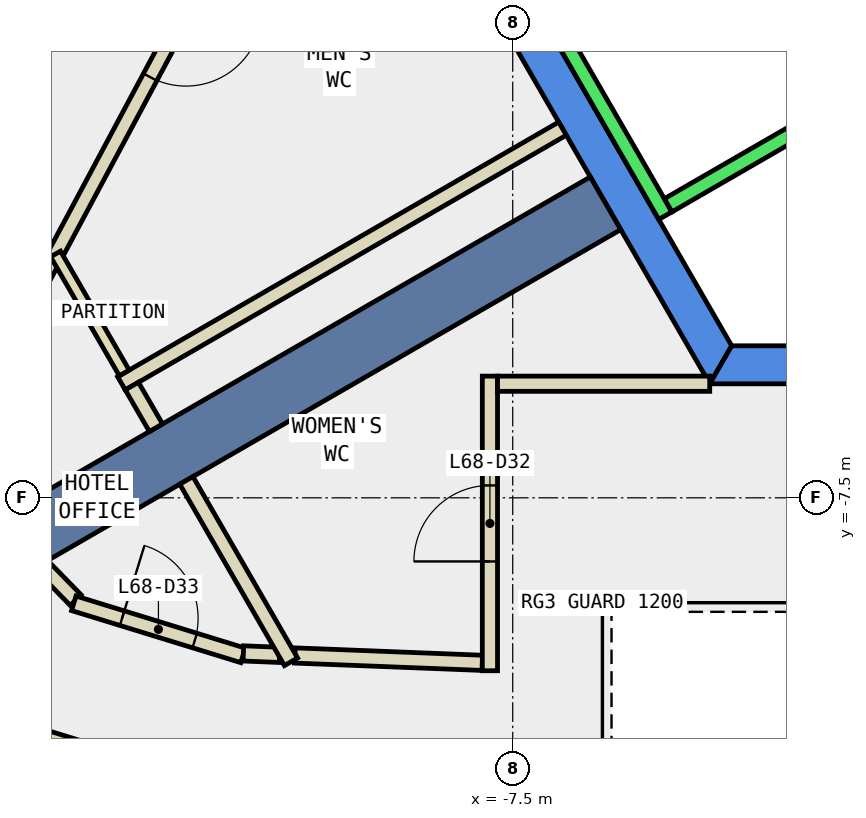
"""IFC4 building model, lengths in metres.
Left out: names, types, materials, properties, quantities, classifications, styles, units other than length and angle.
Written with IfcOpenShell. Run it as: python <this file> out.ifc"""

import sys

from ifc_helpers import new_model, si_unit, direction, frame, frame_2d, origin, place, context, subcontext, project, spatial, polyline, rectangle, outline, extrude, element, fill, save


model = new_model("IFC4")
c1 = context("Model", 3, precision=1e-05, world=origin(), true_north=direction((0.0, 1.0)))
c2 = subcontext(c1, "Body", "Model", "MODEL_VIEW")
j1 = project(units=[si_unit("LENGTHUNIT", "METRE"), si_unit("PLANEANGLEUNIT", "RADIAN")], contexts=[c1])
p1 = place(None, origin())
s1 = spatial("IfcSite", under=j1, at=p1, CompositionType="ELEMENT")
p2 = place(p1, origin())
s2 = spatial("IfcBuilding", under=s1, at=p2, CompositionType="ELEMENT")
p3 = place(p2, frame((0.0, 0.0, 293.6)))
s3 = spatial("IfcBuildingStorey", under=s2, at=p3, CompositionType="ELEMENT", Elevation=293.6)
p4 = place(p3, frame((0.0, 0.0, -0.34)))
e1 = element("IfcWall", 1, at=p4, inside=s3, PredefinedType="SHEAR", context=c2, shape_type="SweptSolid", body=[
    extrude(outline(polyline([(-9.815, 2.5), (-4.907, -6.0), (-4.619, -5.5), (-9.238, 2.5), (-9.815, 2.5)])), origin(), (0.0, 0.0, 1.0), 3.6),
])
p5 = place(p3, frame((0.0, 0.0, -0.34)))
e2 = element("IfcWall", 2, at=p5, inside=s3, PredefinedType="SHEAR", context=c2, shape_type="SweptSolid", body=[
    extrude(outline(polyline([(3.75, -6.0), (3.75, -5.5), (-4.619, -5.5), (-4.907, -6.0), (3.75, -6.0)])), origin(), (0.0, 0.0, 1.0), 3.6),
])
p6 = place(p3, frame((-6.279, -3.625, -0.34), z_axis=(0.0, 0.0, 1.0), x_axis=(-0.866017533419, -0.500013631625, 0.0)))
e3 = element("IfcWall", 3, at=p6, inside=s3, PredefinedType="SHEAR", context=c2, shape_type="SweptSolid", body=[
    extrude(rectangle(XDim=9.0, YDim=0.8, at=frame_2d((4.5, 0.0))), origin(), (0.0, 0.0, 1.0), 3.6),
])
p7 = place(p3, frame((-10.639, 1.084, 0.0), z_axis=(0.0, 0.0, 1.0), x_axis=(-0.471696599276, -0.881760918975, 0.0)))
e4 = element("IfcWall", 4, at=p7, inside=s3, PredefinedType="PARTITIONING", context=c2, shape_type="SweptSolid", body=[
    extrude(rectangle(XDim=6.172, YDim=0.2, at=frame_2d((3.086, 0.0))), origin(), (0.0, 0.0, 1.0), 3.26),
])
p8 = place(p7, frame((2.458, 0.0, 0.0)))
e5 = element("IfcOpeningElement", 5, at=p8, cuts=e4, PredefinedType="OPENING", context=c2, shape_type="SweptSolid", body=[
    extrude(rectangle(XDim=1.0, YDim=2.1, at=frame_2d((0.5, 1.05))), frame((0.0, 0.11, 0.0), z_axis=(0.0, -1.0, 0.0), x_axis=(1.0, 0.0, 0.0)), (0.0, 0.0, 1.0), 0.22),
])
p9 = place(p3, frame((-10.367, -9.574, 0.0), z_axis=(0.0, 0.0, 1.0), x_axis=(0.999229139158, -0.039257196264, 0.0)))
e6 = element("IfcWall", 6, at=p9, inside=s3, PredefinedType="PARTITIONING", context=c2, shape_type="SweptSolid", body=[
    extrude(rectangle(XDim=2.469, YDim=0.2, at=frame_2d((1.234, 0.0))), origin(), (0.0, 0.0, 1.0), 3.26),
])
p10 = place(p3, frame((-13.55, -4.358, 0.0), z_axis=(0.0, 0.0, 1.0), x_axis=(-0.472169364753, -0.881507850781, 0.0)))
e7 = element("IfcWall", 7, at=p10, inside=s3, PredefinedType="PARTITIONING", context=c2, shape_type="SweptSolid", body=[
    extrude(rectangle(XDim=0.521, YDim=0.2, at=frame_2d((0.26, 0.0))), origin(), (0.0, 0.0, 1.0), 3.26),
])
p11 = place(p3, frame((-13.69, -8.395, 0.0), z_axis=(0.0, 0.0, 1.0), x_axis=(0.698333537371, -0.715772499181, 0.0)))
e8 = element("IfcWall", 8, at=p11, inside=s3, PredefinedType="PARTITIONING", context=c2, shape_type="SweptSolid", body=[
    extrude(rectangle(XDim=0.63, YDim=0.2, at=frame_2d((0.315, 0.0))), origin(), (0.0, 0.0, 1.0), 3.26),
])
p12 = place(p3, frame((-13.275, -8.888, 0.0), z_axis=(0.0, 0.0, 1.0), x_axis=(0.955792602122, -0.294041666654, 0.0)))
e9 = element("IfcWall", 9, at=p12, inside=s3, PredefinedType="PARTITIONING", context=c2, shape_type="SweptSolid", body=[
    extrude(rectangle(XDim=2.33, YDim=0.2, at=frame_2d((1.165, 0.0))), origin(), (0.0, 0.0, 1.0), 3.26),
])
p13 = place(p12, frame((0.665, 0.0, 0.0)))
e10 = element("IfcOpeningElement", 10, at=p13, cuts=e9, PredefinedType="OPENING", context=c2, shape_type="SweptSolid", body=[
    extrude(rectangle(XDim=1.0, YDim=2.1, at=frame_2d((0.5, 1.05))), frame((0.0, 0.11, 0.0), z_axis=(0.0, -1.0, 0.0), x_axis=(1.0, 0.0, 0.0)), (0.0, 0.0, 1.0), 0.22),
])
p14 = place(p3, frame((-11.044, -9.547, 0.0), z_axis=(0.0, 0.0, 1.0), x_axis=(0.999224473046, -0.039375785274, 0.0)))
e11 = element("IfcWall", 11, at=p14, inside=s3, PredefinedType="PARTITIONING", context=c2, shape_type="SweptSolid", body=[
    extrude(rectangle(XDim=0.478, YDim=0.2, at=frame_2d((0.239, 0.0))), origin(), (0.0, 0.0, 1.0), 3.26),
])
p15 = place(p3, frame((-12.427, -11.032, 0.0), z_axis=(0.0, 0.0, 1.0), x_axis=(-0.955940341053, 0.293561006177, 0.0)))
e12 = element("IfcWall", 12, at=p15, inside=s3, PredefinedType="PARTITIONING", context=c2, shape_type="SweptSolid", body=[
    extrude(rectangle(XDim=1.7, YDim=0.2, at=frame_2d((0.85, 0.0))), origin(), (0.0, 0.0, 1.0), 3.26),
])
p16 = place(p3, frame((-7.8, -9.775, 0.0), z_axis=(0.0, 0.0, 1.0), x_axis=(0.0, 1.0, 0.0)))
e13 = element("IfcWall", 13, at=p16, inside=s3, PredefinedType="PARTITIONING", context=c2, shape_type="SweptSolid", body=[
    extrude(rectangle(XDim=3.876, YDim=0.2, at=frame_2d((1.938, 0.0))), origin(), (0.0, 0.0, 1.0), 3.26),
])
p17 = place(p16, frame((1.438, 0.0, 0.0)))
e14 = element("IfcOpeningElement", 14, at=p17, cuts=e13, PredefinedType="OPENING", context=c2, shape_type="SweptSolid", body=[
    extrude(rectangle(XDim=1.0, YDim=2.1, at=frame_2d((0.5, 1.05))), frame((0.0, 0.11, 0.0), z_axis=(0.0, -1.0, 0.0), x_axis=(1.0, 0.0, 0.0)), (0.0, 0.0, 1.0), 0.22),
])
p18 = place(p3, frame((-7.7, -5.999, 0.0), z_axis=(0.0, 0.0, 1.0), x_axis=(1.0, 0.0, 0.0)))
e15 = element("IfcWall", 15, at=p18, inside=s3, PredefinedType="PARTITIONING", context=c2, shape_type="SweptSolid", body=[
    extrude(rectangle(XDim=2.792, YDim=0.2, at=frame_2d((1.396, 0.0))), origin(), (0.0, 0.0, 1.0), 3.26),
])
p19 = place(p3, frame((-6.845, -2.643, 0.0), z_axis=(0.0, 0.0, 1.0), x_axis=(-0.865994457699, -0.500053596362, 0.0)))
e16 = element("IfcWall", 16, at=p19, inside=s3, PredefinedType="PARTITIONING", context=c2, shape_type="SweptSolid", body=[
    extrude(rectangle(XDim=6.701, YDim=0.2, at=frame_2d((3.351, 0.0))), origin(), (0.0, 0.0, 1.0), 3.26),
])
p20 = place(p3, frame((-12.611, -5.857, 0.0), z_axis=(0.0, 0.0, 1.0), x_axis=(-0.500120037633, 0.865956088932, 0.0)))
e17 = element("IfcWall", 17, at=p20, inside=s3, PredefinedType="PARTITIONING", context=c2, shape_type="SweptSolid", body=[
    extrude(rectangle(XDim=1.807, YDim=0.15, at=frame_2d((0.904, 0.0))), origin(), (0.0, 0.0, 1.0), 3.26),
])
p21 = place(p3, frame((-10.417, -9.657, 0.0), z_axis=(0.0, 0.0, 1.0), x_axis=(-0.499837531988, 0.866119184418, 0.0)))
e18 = element("IfcWall", 18, at=p21, inside=s3, PredefinedType="PARTITIONING", context=c2, shape_type="SweptSolid", body=[
    extrude(rectangle(XDim=2.755, YDim=0.2, at=frame_2d((1.377, 0.0))), origin(), (0.0, 0.0, 1.0), 3.26),
])
p22 = place(p3, frame((-12.194, -6.578, 0.0), z_axis=(0.0, 0.0, 1.0), x_axis=(-0.500701704226, 0.865619895442, 0.0)))
e19 = element("IfcWall", 19, at=p22, inside=s3, PredefinedType="PARTITIONING", context=c2, shape_type="SweptSolid", body=[
    extrude(rectangle(XDim=0.633, YDim=0.2, at=frame_2d((0.316, 0.0))), origin(), (0.0, 0.0, 1.0), 3.26),
])
p23 = place(p3, frame((-5.94, 2.188, 0.0), z_axis=(0.0, 0.0, 1.0), x_axis=(0.500034260056, -0.866005622828, 0.0)))
e20 = element("IfcWall", 20, at=p23, inside=s3, PredefinedType="STANDARD", context=c2, shape_type="SweptSolid", body=[
    extrude(rectangle(XDim=5.399, YDim=0.2, at=frame_2d((2.7, 0.0))), origin(), (0.0, 0.0, 1.0), 3.26),
])
p24 = place(p23, frame((3.075, 0.0, 0.0)))
e21 = element("IfcOpeningElement", 21, at=p24, cuts=e20, PredefinedType="OPENING", context=c2, shape_type="SweptSolid", body=[
    extrude(rectangle(XDim=1.1, YDim=2.1, at=frame_2d((0.55, 1.05))), frame((0.0, 0.11, 0.0), z_axis=(0.0, -1.0, 0.0), x_axis=(1.0, 0.0, 0.0)), (0.0, 0.0, 1.0), 0.22),
])
p25 = place(p23, frame((1.225, 0.0, 0.0)))
e22 = element("IfcOpeningElement", 22, at=p25, cuts=e20, PredefinedType="OPENING", context=c2, shape_type="SweptSolid", body=[
    extrude(rectangle(XDim=1.1, YDim=2.1, at=frame_2d((0.55, 1.05))), frame((0.0, 0.11, 0.0), z_axis=(0.0, -1.0, 0.0), x_axis=(1.0, 0.0, 0.0)), (0.0, 0.0, 1.0), 0.22),
])
p26 = place(p3, frame((-8.192, 0.888, 0.0), z_axis=(0.0, 0.0, 1.0), x_axis=(0.500034260056, -0.866005622828, 0.0)))
e23 = element("IfcWall", 23, at=p26, inside=s3, PredefinedType="STANDARD", context=c2, shape_type="SweptSolid", body=[
    extrude(rectangle(XDim=5.399, YDim=0.2, at=frame_2d((2.7, 0.0))), origin(), (0.0, 0.0, 1.0), 3.26),
])
p27 = place(p3, frame((-3.377, -2.452, 0.0), z_axis=(0.0, 0.0, 1.0), x_axis=(-0.865955154139, -0.50012165622, 0.0)))
e24 = element("IfcWall", 24, at=p27, inside=s3, PredefinedType="STANDARD", context=c2, shape_type="SweptSolid", body=[
    extrude(rectangle(XDim=2.4, YDim=0.2, at=frame_2d((1.2, 0.0))), origin(), (0.0, 0.0, 1.0), 3.26),
])
p28 = place(p8, origin())
e25 = element("IfcDoor", 25, at=p28, inside=s3, OperationType="SINGLE_SWING_LEFT", PredefinedType="DOOR", context=c2, shape_type="SweptSolid", body=[
    extrude(rectangle(XDim=1.0, YDim=2.1, at=frame_2d((0.5, 1.05))), frame((0.0, 0.025, 0.0), z_axis=(0.0, -1.0, 0.0), x_axis=(1.0, 0.0, 0.0)), (0.0, 0.0, 1.0), 0.05),
])
fill(e5, e25)
p29 = place(p17, origin())
e26 = element("IfcDoor", 26, at=p29, inside=s3, OperationType="SINGLE_SWING_LEFT", PredefinedType="DOOR", context=c2, shape_type="SweptSolid", body=[
    extrude(rectangle(XDim=1.0, YDim=2.1, at=frame_2d((0.5, 1.05))), frame((0.0, 0.025, 0.0), z_axis=(0.0, -1.0, 0.0), x_axis=(1.0, 0.0, 0.0)), (0.0, 0.0, 1.0), 0.05),
])
fill(e14, e26)
p30 = place(p13, origin())
e27 = element("IfcDoor", 27, at=p30, inside=s3, OperationType="SINGLE_SWING_LEFT", PredefinedType="DOOR", context=c2, shape_type="SweptSolid", body=[
    extrude(rectangle(XDim=1.0, YDim=2.1, at=frame_2d((0.5, 1.05))), frame((0.0, 0.025, 0.0), z_axis=(0.0, -1.0, 0.0), x_axis=(1.0, 0.0, 0.0)), (0.0, 0.0, 1.0), 0.05),
])
fill(e10, e27)
save(model, sys.argv[1])
